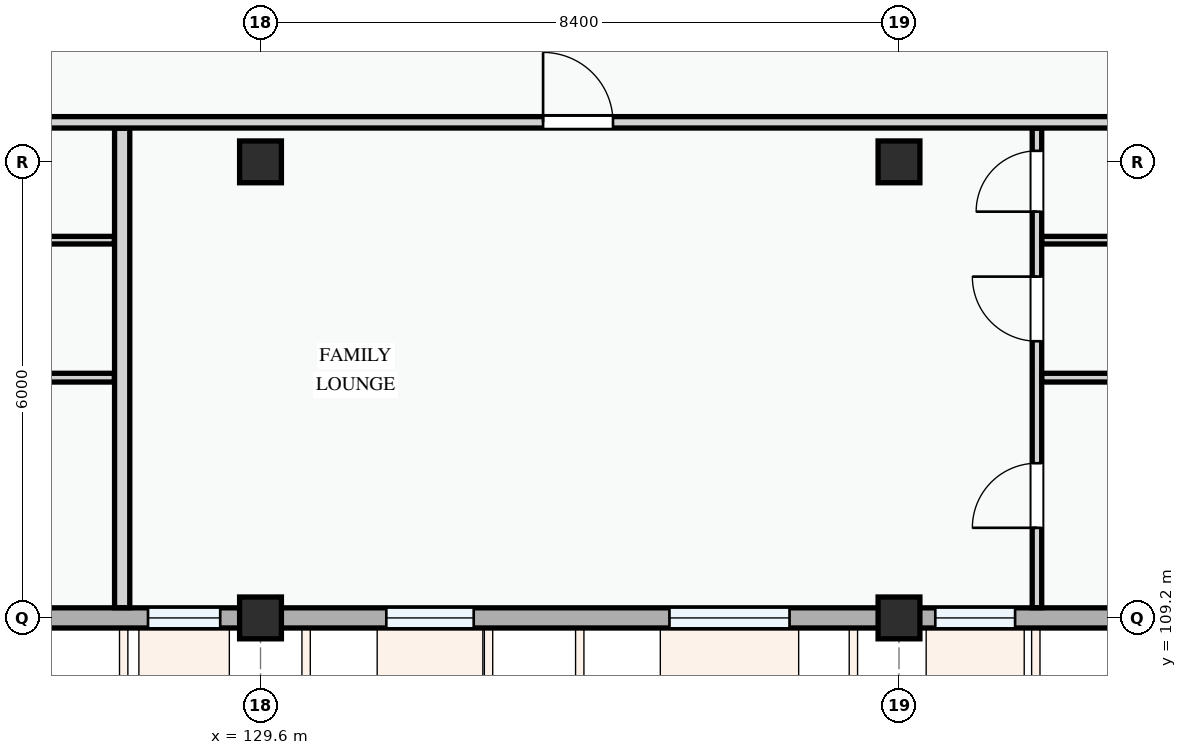
"""IFC4 building model, lengths in metres.
Left out: names, types, materials, properties, quantities, classifications, styles, units other than length and angle.
Written with IfcOpenShell. Run it as: python <this file> out.ifc"""

import sys

from ifc_helpers import new_model, si_unit, direction, frame, frame_2d, origin, origin_2d, place, context, subcontext, project, spatial, rectangle, extrude, element, fill, save


model = new_model("IFC4")
c1 = context("Model", 3, precision=1e-05, world=origin(), true_north=direction((0.0, 1.0)))
c2 = subcontext(c1, "Body", "Model", "MODEL_VIEW")
j1 = project(units=[si_unit("LENGTHUNIT", "METRE"), si_unit("PLANEANGLEUNIT", "RADIAN")], contexts=[c1])
p1 = place(None, origin())
s1 = spatial("IfcSite", under=j1, at=p1, CompositionType="ELEMENT")
p2 = place(p1, origin())
s2 = spatial("IfcBuilding", under=s1, at=p2, CompositionType="ELEMENT")
p3 = place(p2, frame((0.0, 0.0, 31.2)))
s3 = spatial("IfcBuildingStorey", under=s2, at=p3, CompositionType="ELEMENT", Elevation=31.2)
for number, where, z_axis, x_axis in (
    (1, (129.6, 109.2, 0.0), (0.0, 0.0, 1.0), (1.0, 0.0, 0.0)),
    (2, (129.6, 115.2, 0.0), (0.0, 0.0, 1.0), (1.0, 0.0, 0.0)),
    (3, (138.0, 109.2, 0.0), (0.0, 0.0, 1.0), (1.0, 0.0, 0.0)),
    (4, (138.0, 115.2, 0.0), (0.0, 0.0, 1.0), (1.0, 0.0, 0.0)),
):
    element("IfcColumn", number, at=place(p3, frame(where, z_axis=z_axis, x_axis=x_axis)), inside=s3, PredefinedType="COLUMN", context=c2, shape_type="SweptSolid", body=[
        extrude(rectangle(XDim=0.55, YDim=0.55, at=origin_2d()), origin(), (0.0, 0.0, 1.0), 3.3),
    ])
p4 = place(p3, frame((123.6, 109.2, 0.0), z_axis=(0.0, 0.0, 1.0), x_axis=(1.0, 0.0, 0.0)))
e5 = element("IfcWall", 5, at=p4, inside=s3, PredefinedType="STANDARD", context=c2, shape_type="SweptSolid", body=[
    extrude(rectangle(XDim=6.0, YDim=0.265, at=frame_2d((3.0, 0.0))), origin(), (0.0, 0.0, 1.0), 2.525),
])
p5 = place(p4, frame((1.685, 0.0, 0.78)))
e6 = element("IfcOpeningElement", 6, at=p5, cuts=e5, PredefinedType="OPENING", context=c2, shape_type="SweptSolid", body=[
    extrude(rectangle(XDim=1.0, YDim=1.25, at=frame_2d((0.5, 0.625))), frame((0.0, 0.143, 0.0), z_axis=(0.0, -1.0, 0.0), x_axis=(1.0, 0.0, 0.0)), (0.0, 0.0, 1.0), 0.285),
])
p6 = place(p4, frame((4.52, 0.0, 0.78)))
e7 = element("IfcOpeningElement", 7, at=p6, cuts=e5, PredefinedType="OPENING", context=c2, shape_type="SweptSolid", body=[
    extrude(rectangle(XDim=0.95, YDim=1.15, at=frame_2d((0.475, 0.575))), frame((0.0, 0.143, 0.0), z_axis=(0.0, -1.0, 0.0), x_axis=(1.0, 0.0, 0.0)), (0.0, 0.0, 1.0), 0.285),
])
p7 = place(p3, frame((129.6, 109.2, 0.0), z_axis=(0.0, 0.0, 1.0), x_axis=(1.0, 0.0, 0.0)))
e8 = element("IfcWall", 8, at=p7, inside=s3, PredefinedType="STANDARD", context=c2, shape_type="SweptSolid", body=[
    extrude(rectangle(XDim=8.4, YDim=0.265, at=frame_2d((4.2, 0.0))), origin(), (0.0, 0.0, 1.0), 2.375),
])
p8 = place(p7, frame((1.655, 0.0, 0.78)))
e9 = element("IfcOpeningElement", 9, at=p8, cuts=e8, PredefinedType="OPENING", context=c2, shape_type="SweptSolid", body=[
    extrude(rectangle(XDim=1.15, YDim=1.25, at=frame_2d((0.575, 0.625))), frame((0.0, 0.143, 0.0), z_axis=(0.0, -1.0, 0.0), x_axis=(1.0, 0.0, 0.0)), (0.0, 0.0, 1.0), 0.285),
])
p9 = place(p7, frame((5.38, 0.0, 0.78)))
e10 = element("IfcOpeningElement", 10, at=p9, cuts=e8, PredefinedType="OPENING", context=c2, shape_type="SweptSolid", body=[
    extrude(rectangle(XDim=1.58, YDim=1.48, at=frame_2d((0.79, 0.74))), frame((0.0, 0.143, 0.0), z_axis=(0.0, -1.0, 0.0), x_axis=(1.0, 0.0, 0.0)), (0.0, 0.0, 1.0), 0.285),
])
p10 = place(p3, frame((138.0, 109.2, 0.0), z_axis=(0.0, 0.0, 1.0), x_axis=(1.0, 0.0, 0.0)))
e11 = element("IfcWall", 11, at=p10, inside=s3, PredefinedType="STANDARD", context=c2, shape_type="SweptSolid", body=[
    extrude(rectangle(XDim=6.0, YDim=0.265, at=frame_2d((3.0, 0.0))), origin(), (0.0, 0.0, 1.0), 2.525),
])
p11 = place(p10, frame((0.478, 0.0, 0.78)))
e12 = element("IfcOpeningElement", 12, at=p11, cuts=e11, PredefinedType="OPENING", context=c2, shape_type="SweptSolid", body=[
    extrude(rectangle(XDim=1.05, YDim=1.2, at=frame_2d((0.525, 0.6))), frame((0.0, 0.143, 0.0), z_axis=(0.0, -1.0, 0.0), x_axis=(1.0, 0.0, 0.0)), (0.0, 0.0, 1.0), 0.285),
])
p12 = place(p10, frame((3.087, 0.0, 0.78)))
e13 = element("IfcOpeningElement", 13, at=p12, cuts=e11, PredefinedType="OPENING", context=c2, shape_type="SweptSolid", body=[
    extrude(rectangle(XDim=1.45, YDim=1.6, at=frame_2d((0.725, 0.8))), frame((0.0, 0.143, 0.0), z_axis=(0.0, -1.0, 0.0), x_axis=(1.0, 0.0, 0.0)), (0.0, 0.0, 1.0), 0.285),
])
p13 = place(p3, frame((117.014, 112.361, 0.0), z_axis=(0.0, 0.0, 1.0), x_axis=(1.0, 0.0, 0.0)))
e14 = element("IfcWall", 14, at=p13, inside=s3, PredefinedType="PARTITIONING", context=c2, shape_type="SweptSolid", body=[
    extrude(rectangle(XDim=10.664, YDim=0.115, at=frame_2d((5.332, 0.0))), origin(), (0.0, 0.0, 1.0), 3.0),
])
p14 = place(p3, frame((117.014, 114.17, 0.0), z_axis=(0.0, 0.0, 1.0), x_axis=(1.0, 0.0, 0.0)))
e15 = element("IfcWall", 15, at=p14, inside=s3, PredefinedType="PARTITIONING", context=c2, shape_type="SweptSolid", body=[
    extrude(rectangle(XDim=10.664, YDim=0.1, at=frame_2d((5.332, 0.0))), origin(), (0.0, 0.0, 1.0), 3.0),
])
p15 = place(p3, frame((139.815, 109.334, 0.0), z_axis=(0.0, 0.0, 1.0), x_axis=(0.0, 1.0, 0.0)))
e16 = element("IfcWall", 16, at=p15, inside=s3, PredefinedType="PARTITIONING", context=c2, shape_type="SweptSolid", body=[
    extrude(rectangle(XDim=6.309, YDim=0.125, at=frame_2d((3.154, 0.0))), origin(), (0.0, 0.0, 1.0), 3.0),
])
p16 = place(p15, frame((1.051, 0.0, 0.0)))
e17 = element("IfcOpeningElement", 17, at=p16, cuts=e16, PredefinedType="OPENING", context=c2, shape_type="SweptSolid", body=[
    extrude(rectangle(XDim=0.85, YDim=2.1, at=frame_2d((0.425, 1.05))), frame((0.0, 0.073, 0.0), z_axis=(0.0, -1.0, 0.0), x_axis=(1.0, 0.0, 0.0)), (0.0, 0.0, 1.0), 0.145),
])
p17 = place(p15, frame((3.506, 0.0, 0.0)))
e18 = element("IfcOpeningElement", 18, at=p17, cuts=e16, PredefinedType="OPENING", context=c2, shape_type="SweptSolid", body=[
    extrude(rectangle(XDim=0.85, YDim=2.1, at=frame_2d((0.425, 1.05))), frame((0.0, 0.073, 0.0), z_axis=(0.0, -1.0, 0.0), x_axis=(1.0, 0.0, 0.0)), (0.0, 0.0, 1.0), 0.145),
])
p18 = place(p15, frame((5.21, 0.0, 0.0)))
e19 = element("IfcOpeningElement", 19, at=p18, cuts=e16, PredefinedType="OPENING", context=c2, shape_type="SweptSolid", body=[
    extrude(rectangle(XDim=0.8, YDim=2.1, at=frame_2d((0.4, 1.05))), frame((0.0, 0.073, 0.0), z_axis=(0.0, -1.0, 0.0), x_axis=(1.0, 0.0, 0.0)), (0.0, 0.0, 1.0), 0.145),
])
p19 = place(p3, frame((139.879, 112.361, 0.0), z_axis=(0.0, 0.0, 1.0), x_axis=(1.0, 0.0, 0.0)))
e20 = element("IfcWall", 20, at=p19, inside=s3, PredefinedType="PARTITIONING", context=c2, shape_type="SweptSolid", body=[
    extrude(rectangle(XDim=10.094, YDim=0.115, at=frame_2d((5.047, 0.0))), origin(), (0.0, 0.0, 1.0), 3.0),
])
p20 = place(p3, frame((139.879, 114.17, 0.0), z_axis=(0.0, 0.0, 1.0), x_axis=(1.0, 0.0, 0.0)))
e21 = element("IfcWall", 21, at=p20, inside=s3, PredefinedType="PARTITIONING", context=c2, shape_type="SweptSolid", body=[
    extrude(rectangle(XDim=10.094, YDim=0.1, at=frame_2d((5.047, 0.0))), origin(), (0.0, 0.0, 1.0), 3.0),
])
p21 = place(p3, frame((127.78, 109.334, 0.0), z_axis=(0.0, 0.0, 1.0), x_axis=(0.0, 1.0, 0.0)))
e22 = element("IfcWall", 22, at=p21, inside=s3, PredefinedType="PARTITIONING", context=c2, shape_type="SweptSolid", body=[
    extrude(rectangle(XDim=6.309, YDim=0.2, at=frame_2d((3.154, 0.0))), origin(), (0.0, 0.0, 1.0), 3.0),
])
p22 = place(p3, frame((80.534, 115.72, 0.0), z_axis=(0.0, 0.0, 1.0), x_axis=(1.0, 0.0, 0.0)))
e23 = element("IfcWall", 23, at=p22, inside=s3, PredefinedType="PARTITIONING", context=c2, shape_type="SweptSolid", body=[
    extrude(rectangle(XDim=69.516, YDim=0.15, at=frame_2d((34.758, 0.0))), origin(), (0.0, 0.0, 1.0), 3.0),
])
p23 = place(p22, frame((9.573, 0.0, 0.0)))
e24 = element("IfcOpeningElement", 24, at=p23, cuts=e23, PredefinedType="OPENING", context=c2, shape_type="SweptSolid", body=[
    extrude(rectangle(XDim=0.96, YDim=2.12, at=frame_2d((0.48, 1.06))), frame((0.0, 0.085, 0.0), z_axis=(0.0, -1.0, 0.0), x_axis=(1.0, 0.0, 0.0)), (0.0, 0.0, 1.0), 0.17),
])
p24 = place(p22, frame((23.835, 0.0, 0.0)))
e25 = element("IfcOpeningElement", 25, at=p24, cuts=e23, PredefinedType="OPENING", context=c2, shape_type="SweptSolid", body=[
    extrude(rectangle(XDim=0.92, YDim=2.1, at=frame_2d((0.46, 1.05))), frame((0.0, 0.085, 0.0), z_axis=(0.0, -1.0, 0.0), x_axis=(1.0, 0.0, 0.0)), (0.0, 0.0, 1.0), 0.17),
])
p25 = place(p22, frame((52.783, 0.0, 0.0)))
e26 = element("IfcOpeningElement", 26, at=p25, cuts=e23, PredefinedType="OPENING", context=c2, shape_type="SweptSolid", body=[
    extrude(rectangle(XDim=0.92, YDim=2.1, at=frame_2d((0.46, 1.05))), frame((0.0, 0.085, 0.0), z_axis=(0.0, -1.0, 0.0), x_axis=(1.0, 0.0, 0.0)), (0.0, 0.0, 1.0), 0.17),
])
p26 = place(p6, origin())
e27 = element("IfcWindow", 27, at=p26, inside=s3, PartitioningType="SINGLE_PANEL", PredefinedType="WINDOW", context=c2, shape_type="SweptSolid", body=[
    extrude(rectangle(XDim=0.95, YDim=1.15, at=frame_2d((0.475, 0.575))), frame((0.0, 0.03, 0.0), z_axis=(0.0, -1.0, 0.0), x_axis=(1.0, 0.0, 0.0)), (0.0, 0.0, 1.0), 0.06),
])
fill(e7, e27)
p27 = place(p8, origin())
e28 = element("IfcWindow", 28, at=p27, inside=s3, PartitioningType="SINGLE_PANEL", PredefinedType="WINDOW", context=c2, shape_type="SweptSolid", body=[
    extrude(rectangle(XDim=1.15, YDim=1.25, at=frame_2d((0.575, 0.625))), frame((0.0, 0.03, 0.0), z_axis=(0.0, -1.0, 0.0), x_axis=(1.0, 0.0, 0.0)), (0.0, 0.0, 1.0), 0.06),
])
fill(e9, e28)
p28 = place(p9, origin())
e29 = element("IfcWindow", 29, at=p28, inside=s3, PartitioningType="SINGLE_PANEL", PredefinedType="WINDOW", context=c2, shape_type="SweptSolid", body=[
    extrude(rectangle(XDim=1.58, YDim=1.48, at=frame_2d((0.79, 0.74))), frame((0.0, 0.03, 0.0), z_axis=(0.0, -1.0, 0.0), x_axis=(1.0, 0.0, 0.0)), (0.0, 0.0, 1.0), 0.06),
])
fill(e10, e29)
p29 = place(p11, origin())
e30 = element("IfcWindow", 30, at=p29, inside=s3, PartitioningType="SINGLE_PANEL", PredefinedType="WINDOW", context=c2, shape_type="SweptSolid", body=[
    extrude(rectangle(XDim=1.05, YDim=1.2, at=frame_2d((0.525, 0.6))), frame((0.0, 0.03, 0.0), z_axis=(0.0, -1.0, 0.0), x_axis=(1.0, 0.0, 0.0)), (0.0, 0.0, 1.0), 0.06),
])
fill(e12, e30)
p30 = place(p16, origin())
e31 = element("IfcDoor", 31, at=p30, inside=s3, OperationType="SINGLE_SWING_LEFT", PredefinedType="DOOR", context=c2, shape_type="SweptSolid", body=[
    extrude(rectangle(XDim=0.85, YDim=2.1, at=frame_2d((0.425, 1.05))), frame((0.0, 0.025, 0.0), z_axis=(0.0, -1.0, 0.0), x_axis=(1.0, 0.0, 0.0)), (0.0, 0.0, 1.0), 0.05),
])
fill(e17, e31)
p31 = place(p17, origin())
e32 = element("IfcDoor", 32, at=p31, inside=s3, OperationType="SINGLE_SWING_RIGHT", PredefinedType="DOOR", context=c2, shape_type="SweptSolid", body=[
    extrude(rectangle(XDim=0.85, YDim=2.1, at=frame_2d((0.425, 1.05))), frame((0.0, 0.025, 0.0), z_axis=(0.0, -1.0, 0.0), x_axis=(1.0, 0.0, 0.0)), (0.0, 0.0, 1.0), 0.05),
])
fill(e18, e32)
p32 = place(p18, origin())
e33 = element("IfcDoor", 33, at=p32, inside=s3, OperationType="SINGLE_SWING_LEFT", PredefinedType="DOOR", context=c2, shape_type="SweptSolid", body=[
    extrude(rectangle(XDim=0.8, YDim=2.1, at=frame_2d((0.4, 1.05))), frame((0.0, 0.025, 0.0), z_axis=(0.0, -1.0, 0.0), x_axis=(1.0, 0.0, 0.0)), (0.0, 0.0, 1.0), 0.05),
])
fill(e19, e33)
p33 = place(p25, origin())
e34 = element("IfcDoor", 34, at=p33, inside=s3, OperationType="SINGLE_SWING_LEFT", PredefinedType="DOOR", context=c2, shape_type="SweptSolid", body=[
    extrude(rectangle(XDim=0.92, YDim=2.1, at=frame_2d((0.46, 1.05))), frame((0.0, 0.025, 0.0), z_axis=(0.0, -1.0, 0.0), x_axis=(1.0, 0.0, 0.0)), (0.0, 0.0, 1.0), 0.05),
])
fill(e26, e34)
save(model, sys.argv[1])
